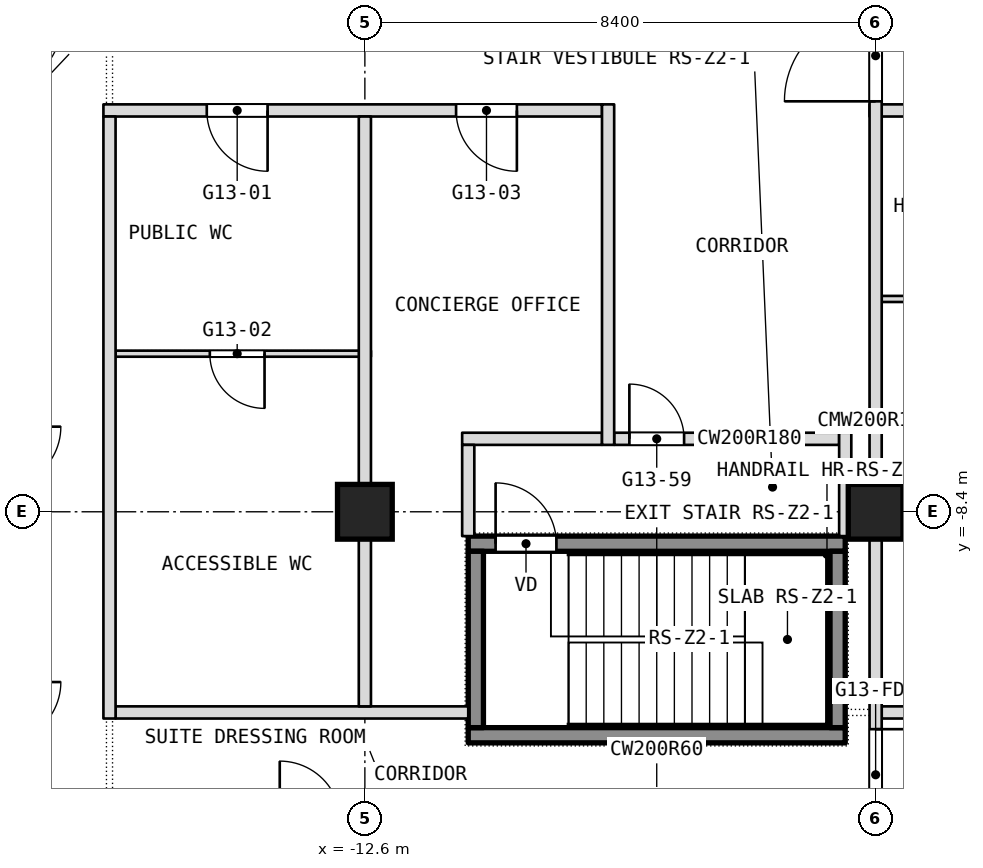
"""IFC4 building model, lengths in metres.
Left out: names, types, materials, properties, quantities, classifications, styles, units other than length and angle.
Written with IfcOpenShell. Run it as: python <this file> out.ifc"""

import sys

from ifc_helpers import new_model, si_unit, direction, frame, frame_2d, origin, origin_2d, place, context, subcontext, project, spatial, rectangle, extrude, element, fill, save


model = new_model("IFC4")
c1 = context("Model", 3, precision=1e-05, world=origin(), true_north=direction((0.0, 1.0)))
c2 = subcontext(c1, "Body", "Model", "MODEL_VIEW")
j1 = project(units=[si_unit("LENGTHUNIT", "METRE"), si_unit("PLANEANGLEUNIT", "RADIAN")], contexts=[c1])
p1 = place(None, origin())
s1 = spatial("IfcSite", under=j1, at=p1, CompositionType="ELEMENT")
p2 = place(p1, origin())
s2 = spatial("IfcBuilding", under=s1, at=p2, CompositionType="ELEMENT")
p3 = place(p2, frame((0.0, 0.0, 151.7)))
s3 = spatial("IfcBuildingStorey", under=s2, at=p3, CompositionType="ELEMENT", Elevation=151.7)
for number, where, z_axis, x_axis in (
    (1, (-12.6, -8.4, 0.0), (0.0, 0.0, 1.0), (1.0, 0.0, 0.0)),
    (2, (-4.2, -8.4, 0.0), (0.0, 0.0, 1.0), (1.0, 0.0, 0.0)),
):
    element("IfcColumn", number, at=place(p3, frame(where, z_axis=z_axis, x_axis=x_axis)), inside=s3, PredefinedType="COLUMN", context=c2, shape_type="SweptSolid", body=[
        extrude(rectangle(XDim=0.9, YDim=0.9, at=origin_2d()), origin(), (0.0, 0.0, 1.0), 3.6),
    ])
p4 = place(p3, frame((-16.7, -11.7, 0.0), z_axis=(0.0, 0.0, 1.0), x_axis=(1.0, 0.0, 0.0)))
e3 = element("IfcWall", 3, at=p4, inside=s3, PredefinedType="PARTITIONING", context=c2, shape_type="SweptSolid", body=[
    extrude(rectangle(XDim=5.8, YDim=0.2, at=frame_2d((2.9, 0.0))), origin(), (0.0, 0.0, 1.0), 3.34),
])
p5 = place(p3, frame((-4.1, -11.7, 0.0), z_axis=(0.0, 0.0, 1.0), x_axis=(1.0, 0.0, 0.0)))
e4 = element("IfcWall", 4, at=p5, inside=s3, PredefinedType="PARTITIONING", context=c2, shape_type="SweptSolid", body=[
    extrude(rectangle(XDim=20.8, YDim=0.2, at=frame_2d((10.4, 0.0))), origin(), (0.0, 0.0, 1.0), 3.34),
])
p6 = place(p5, frame((14.1, 0.0, 0.0)))
e5 = element("IfcOpeningElement", 5, at=p6, cuts=e4, PredefinedType="OPENING", context=c2, shape_type="SweptSolid", body=[
    extrude(rectangle(XDim=1.0, YDim=2.1, at=frame_2d((0.5, 1.05))), frame((0.0, 0.1, 0.0), z_axis=(0.0, -1.0, 0.0), x_axis=(1.0, 0.0, 0.0)), (0.0, 0.0, 1.0), 0.2),
])
p7 = place(p5, frame((5.7, 0.0, 0.0)))
e6 = element("IfcOpeningElement", 6, at=p7, cuts=e4, PredefinedType="OPENING", context=c2, shape_type="SweptSolid", body=[
    extrude(rectangle(XDim=1.0, YDim=2.1, at=frame_2d((0.5, 1.05))), frame((0.0, 0.1, 0.0), z_axis=(0.0, -1.0, 0.0), x_axis=(1.0, 0.0, 0.0)), (0.0, 0.0, 1.0), 0.2),
])
p8 = place(p3, frame((-11.0, -7.2, 0.0), z_axis=(0.0, 0.0, 1.0), x_axis=(1.0, 0.0, 0.0)))
e7 = element("IfcWall", 7, at=p8, inside=s3, PredefinedType="PARTITIONING", context=c2, shape_type="SweptSolid", body=[
    extrude(rectangle(XDim=2.3, YDim=0.2, at=frame_2d((1.15, 0.0))), origin(), (0.0, 0.0, 1.0), 3.34),
])
p9 = place(p3, frame((-8.5, -7.2, 0.0), z_axis=(0.0, 0.0, 1.0), x_axis=(1.0, 0.0, 0.0)))
e8 = element("IfcWall", 8, at=p9, inside=s3, PredefinedType="PARTITIONING", context=c2, shape_type="SweptSolid", body=[
    extrude(rectangle(XDim=3.7, YDim=0.2, at=frame_2d((1.85, 0.0))), origin(), (0.0, 0.0, 1.0), 3.34),
])
p10 = place(p9, frame((0.25, 0.0, 0.0)))
e9 = element("IfcOpeningElement", 9, at=p10, cuts=e8, PredefinedType="OPENING", context=c2, shape_type="SweptSolid", body=[
    extrude(rectangle(XDim=0.9, YDim=2.1, at=frame_2d((0.45, 1.05))), frame((0.0, 0.1, 0.0), z_axis=(0.0, -1.0, 0.0), x_axis=(1.0, 0.0, 0.0)), (0.0, 0.0, 1.0), 0.2),
])
p11 = place(p3, frame((-16.7, -5.8, 0.0), z_axis=(0.0, 0.0, 1.0), x_axis=(1.0, 0.0, 0.0)))
e10 = element("IfcWall", 10, at=p11, inside=s3, PredefinedType="PARTITIONING", context=c2, shape_type="SweptSolid", body=[
    extrude(rectangle(XDim=4.2, YDim=0.1, at=frame_2d((2.1, 0.0))), origin(), (0.0, 0.0, 1.0), 3.34),
])
p12 = place(p11, frame((1.55, 0.0, 0.0)))
e11 = element("IfcOpeningElement", 11, at=p12, cuts=e10, PredefinedType="OPENING", context=c2, shape_type="SweptSolid", body=[
    extrude(rectangle(XDim=0.9, YDim=2.1, at=frame_2d((0.45, 1.05))), frame((0.0, 0.05, 0.0), z_axis=(0.0, -1.0, 0.0), x_axis=(1.0, 0.0, 0.0)), (0.0, 0.0, 1.0), 0.1),
])
p13 = place(p3, frame((-4.1, -4.9, 0.0), z_axis=(0.0, 0.0, 1.0), x_axis=(1.0, 0.0, 0.0)))
e12 = element("IfcWall", 12, at=p13, inside=s3, PredefinedType="PARTITIONING", context=c2, shape_type="SweptSolid", body=[
    extrude(rectangle(XDim=4.2, YDim=0.1, at=frame_2d((2.1, 0.0))), origin(), (0.0, 0.0, 1.0), 3.34),
])
p14 = place(p13, frame((1.55, 0.0, 0.0)))
e13 = element("IfcOpeningElement", 13, at=p14, cuts=e12, PredefinedType="OPENING", context=c2, shape_type="SweptSolid", body=[
    extrude(rectangle(XDim=0.9, YDim=2.1, at=frame_2d((0.45, 1.05))), frame((0.0, 0.05, 0.0), z_axis=(0.0, -1.0, 0.0), x_axis=(1.0, 0.0, 0.0)), (0.0, 0.0, 1.0), 0.1),
])
p15 = place(p3, frame((-16.9, -1.8, 0.0), z_axis=(0.0, 0.0, 1.0), x_axis=(1.0, 0.0, 0.0)))
e14 = element("IfcWall", 14, at=p15, inside=s3, PredefinedType="PARTITIONING", context=c2, shape_type="SweptSolid", body=[
    extrude(rectangle(XDim=8.2, YDim=0.2, at=frame_2d((4.1, 0.0))), origin(), (0.0, 0.0, 1.0), 3.34),
])
p16 = place(p15, frame((1.7, 0.0, 0.0)))
e15 = element("IfcOpeningElement", 15, at=p16, cuts=e14, PredefinedType="OPENING", context=c2, shape_type="SweptSolid", body=[
    extrude(rectangle(XDim=1.0, YDim=2.1, at=frame_2d((0.5, 1.05))), frame((0.0, 0.1, 0.0), z_axis=(0.0, -1.0, 0.0), x_axis=(1.0, 0.0, 0.0)), (0.0, 0.0, 1.0), 0.2),
])
p17 = place(p15, frame((5.8, 0.0, 0.0)))
e16 = element("IfcOpeningElement", 16, at=p17, cuts=e14, PredefinedType="OPENING", context=c2, shape_type="SweptSolid", body=[
    extrude(rectangle(XDim=1.0, YDim=2.1, at=frame_2d((0.5, 1.05))), frame((0.0, 0.1, 0.0), z_axis=(0.0, -1.0, 0.0), x_axis=(1.0, 0.0, 0.0)), (0.0, 0.0, 1.0), 0.2),
])
p18 = place(p3, frame((-4.3, -1.8, 0.0), z_axis=(0.0, 0.0, 1.0), x_axis=(1.0, 0.0, 0.0)))
e17 = element("IfcWall", 17, at=p18, inside=s3, PredefinedType="PARTITIONING", context=c2, shape_type="SweptSolid", body=[
    extrude(rectangle(XDim=11.3, YDim=0.2, at=frame_2d((5.65, 0.0))), origin(), (0.0, 0.0, 1.0), 3.34),
])
p19 = place(p18, frame((1.7, 0.0, 0.0)))
e18 = element("IfcOpeningElement", 18, at=p19, cuts=e17, PredefinedType="OPENING", context=c2, shape_type="SweptSolid", body=[
    extrude(rectangle(XDim=1.0, YDim=2.1, at=frame_2d((0.5, 1.05))), frame((0.0, 0.1, 0.0), z_axis=(0.0, -1.0, 0.0), x_axis=(1.0, 0.0, 0.0)), (0.0, 0.0, 1.0), 0.2),
])
p20 = place(p18, frame((10.1, 0.0, 0.0)))
e19 = element("IfcOpeningElement", 19, at=p20, cuts=e17, PredefinedType="OPENING", context=c2, shape_type="SweptSolid", body=[
    extrude(rectangle(XDim=1.0, YDim=2.1, at=frame_2d((0.5, 1.05))), frame((0.0, 0.1, 0.0), z_axis=(0.0, -1.0, 0.0), x_axis=(1.0, 0.0, 0.0)), (0.0, 0.0, 1.0), 0.2),
])
p21 = place(p18, frame((5.9, 0.0, 0.0)))
e20 = element("IfcOpeningElement", 20, at=p21, cuts=e17, PredefinedType="OPENING", context=c2, shape_type="SweptSolid", body=[
    extrude(rectangle(XDim=1.0, YDim=2.1, at=frame_2d((0.5, 1.05))), frame((0.0, 0.1, 0.0), z_axis=(0.0, -1.0, 0.0), x_axis=(1.0, 0.0, 0.0)), (0.0, 0.0, 1.0), 0.2),
])
p22 = place(p3, frame((-4.2, -13.8, 0.0), z_axis=(0.0, 0.0, 1.0), x_axis=(0.0, 1.0, 0.0)))
e21 = element("IfcWall", 21, at=p22, inside=s3, PredefinedType="PARTITIONING", context=c2, shape_type="SweptSolid", body=[
    extrude(rectangle(XDim=13.8, YDim=0.2, at=frame_2d((6.9, 0.0))), origin(), (0.0, 0.0, 1.0), 3.34),
])
p23 = place(p22, frame((12.15, 0.0, 0.0)))
e22 = element("IfcOpeningElement", 22, at=p23, cuts=e21, PredefinedType="OPENING", context=c2, shape_type="SweptSolid", body=[
    extrude(rectangle(XDim=1.5, YDim=2.1, at=frame_2d((0.75, 1.05))), frame((0.0, 0.1, 0.0), z_axis=(0.0, -1.0, 0.0), x_axis=(1.0, 0.0, 0.0)), (0.0, 0.0, 1.0), 0.2),
])
p24 = place(p22, frame((0.325, 0.0, 0.0)))
e23 = element("IfcOpeningElement", 23, at=p24, cuts=e21, PredefinedType="OPENING", context=c2, shape_type="SweptSolid", body=[
    extrude(rectangle(XDim=1.5, YDim=2.1, at=frame_2d((0.75, 1.05))), frame((0.0, 0.1, 0.0), z_axis=(0.0, -1.0, 0.0), x_axis=(1.0, 0.0, 0.0)), (0.0, 0.0, 1.0), 0.2),
])
p25 = place(p3, frame((-4.7, -8.8, 0.0), z_axis=(0.0, 0.0, 1.0), x_axis=(0.0, 1.0, 0.0)))
e24 = element("IfcWall", 24, at=p25, inside=s3, PredefinedType="PARTITIONING", context=c2, shape_type="SweptSolid", body=[
    extrude(rectangle(XDim=1.7, YDim=0.2, at=frame_2d((0.85, 0.0))), origin(), (0.0, 0.0, 1.0), 3.34),
])
p26 = place(p3, frame((-8.6, -7.3, 0.0), z_axis=(0.0, 0.0, 1.0), x_axis=(0.0, 1.0, 0.0)))
e25 = element("IfcWall", 25, at=p26, inside=s3, PredefinedType="PARTITIONING", context=c2, shape_type="SweptSolid", body=[
    extrude(rectangle(XDim=5.6, YDim=0.2, at=frame_2d((2.8, 0.0))), origin(), (0.0, 0.0, 1.0), 3.34),
])
p27 = place(p3, frame((-10.9, -8.8, 0.0), z_axis=(0.0, 0.0, 1.0), x_axis=(0.0, 1.0, 0.0)))
e26 = element("IfcWall", 26, at=p27, inside=s3, PredefinedType="PARTITIONING", context=c2, shape_type="SweptSolid", body=[
    extrude(rectangle(XDim=1.5, YDim=0.2, at=frame_2d((0.75, 0.0))), origin(), (0.0, 0.0, 1.0), 3.34),
])
p28 = place(p3, frame((-12.6, -11.6, 0.0), z_axis=(0.0, 0.0, 1.0), x_axis=(0.0, 1.0, 0.0)))
e27 = element("IfcWall", 27, at=p28, inside=s3, PredefinedType="PARTITIONING", context=c2, shape_type="SweptSolid", body=[
    extrude(rectangle(XDim=9.7, YDim=0.2, at=frame_2d((4.85, 0.0))), origin(), (0.0, 0.0, 1.0), 3.34),
])
p29 = place(p3, frame((-16.8, -11.8, 0.0), z_axis=(0.0, 0.0, 1.0), x_axis=(0.0, 1.0, 0.0)))
e28 = element("IfcWall", 28, at=p29, inside=s3, PredefinedType="PARTITIONING", context=c2, shape_type="SweptSolid", body=[
    extrude(rectangle(XDim=9.9, YDim=0.2, at=frame_2d((4.95, 0.0))), origin(), (0.0, 0.0, 1.0), 3.34),
])
p30 = place(p3, frame((-10.9, -12.075, 0.1), z_axis=(0.0, 0.0, 1.0), x_axis=(1.0, 0.0, 0.0)))
e29 = element("IfcWall", 29, at=p30, inside=s3, PredefinedType="SHEAR", context=c2, shape_type="SweptSolid", body=[
    extrude(rectangle(XDim=6.2, YDim=0.25, at=frame_2d((3.1, 0.0))), origin(), (0.0, 0.0, 1.0), 3.6),
])
p31 = place(p3, frame((-10.9, -8.925, 0.1), z_axis=(0.0, 0.0, 1.0), x_axis=(1.0, 0.0, 0.0)))
e30 = element("IfcWall", 30, at=p31, inside=s3, PredefinedType="SHEAR", context=c2, shape_type="SweptSolid", body=[
    extrude(rectangle(XDim=6.2, YDim=0.25, at=frame_2d((3.1, 0.0))), origin(), (0.0, 0.0, 1.0), 3.6),
])
p32 = place(p31, frame((0.45, 0.0, 0.0)))
e31 = element("IfcOpeningElement", 31, at=p32, cuts=e30, PredefinedType="OPENING", context=c2, shape_type="SweptSolid", body=[
    extrude(rectangle(XDim=1.0, YDim=2.1, at=frame_2d((0.5, 1.05))), frame((0.0, 0.125, 0.0), z_axis=(0.0, -1.0, 0.0), x_axis=(1.0, 0.0, 0.0)), (0.0, 0.0, 1.0), 0.25),
])
for number, where, z_axis, x_axis in (
    (32, (-10.775, -11.95, 0.1), (0.0, 0.0, 1.0), (0.0, 1.0, 0.0)),
    (33, (-4.825, -11.95, 0.1), (0.0, 0.0, 1.0), (0.0, 1.0, 0.0)),
):
    element("IfcWall", number, at=place(p3, frame(where, z_axis=z_axis, x_axis=x_axis)), inside=s3, PredefinedType="SHEAR", context=c2, shape_type="SweptSolid", body=[
        extrude(rectangle(XDim=2.9, YDim=0.25, at=frame_2d((1.45, 0.0))), origin(), (0.0, 0.0, 1.0), 3.6),
    ])
p33 = place(p10, origin())
e34 = element("IfcDoor", 34, at=p33, inside=s3, OperationType="SINGLE_SWING_RIGHT", PredefinedType="DOOR", context=c2, shape_type="SweptSolid", body=[
    extrude(rectangle(XDim=0.9, YDim=2.1, at=frame_2d((0.45, 1.05))), frame((0.0, 0.025, 0.0), z_axis=(0.0, -1.0, 0.0), x_axis=(1.0, 0.0, 0.0)), (0.0, 0.0, 1.0), 0.05),
])
fill(e9, e34)
p34 = place(p12, origin())
e35 = element("IfcDoor", 35, at=p34, inside=s3, OperationType="SINGLE_SWING_RIGHT", PredefinedType="DOOR", context=c2, shape_type="SweptSolid", body=[
    extrude(rectangle(XDim=0.9, YDim=2.1, at=frame_2d((0.45, 1.05))), frame((0.0, 0.025, 0.0), z_axis=(0.0, -1.0, 0.0), x_axis=(1.0, 0.0, 0.0)), (0.0, 0.0, 1.0), 0.05),
])
fill(e11, e35)
p35 = place(p16, origin())
e36 = element("IfcDoor", 36, at=p35, inside=s3, OperationType="SINGLE_SWING_LEFT", PredefinedType="DOOR", context=c2, shape_type="SweptSolid", body=[
    extrude(rectangle(XDim=1.0, YDim=2.1, at=frame_2d((0.5, 1.05))), frame((0.0, 0.025, 0.0), z_axis=(0.0, -1.0, 0.0), x_axis=(1.0, 0.0, 0.0)), (0.0, 0.0, 1.0), 0.05),
])
fill(e15, e36)
p36 = place(p17, origin())
e37 = element("IfcDoor", 37, at=p36, inside=s3, OperationType="SINGLE_SWING_LEFT", PredefinedType="DOOR", context=c2, shape_type="SweptSolid", body=[
    extrude(rectangle(XDim=1.0, YDim=2.1, at=frame_2d((0.5, 1.05))), frame((0.0, 0.025, 0.0), z_axis=(0.0, -1.0, 0.0), x_axis=(1.0, 0.0, 0.0)), (0.0, 0.0, 1.0), 0.05),
])
fill(e16, e37)
p37 = place(p32, origin())
e38 = element("IfcDoor", 38, at=p37, inside=s3, OperationType="SINGLE_SWING_LEFT", PredefinedType="DOOR", context=c2, shape_type="SweptSolid", body=[
    extrude(rectangle(XDim=1.0, YDim=2.1, at=frame_2d((0.5, 1.05))), frame((0.0, 0.025, 0.0), z_axis=(0.0, -1.0, 0.0), x_axis=(1.0, 0.0, 0.0)), (0.0, 0.0, 1.0), 0.05),
])
fill(e31, e38)
p38 = place(p23, origin())
e39 = element("IfcDoor", 39, at=p38, inside=s3, OperationType="DOUBLE_DOOR_DOUBLE_SWING", PredefinedType="DOOR", context=c2, shape_type="SweptSolid", body=[
    extrude(rectangle(XDim=1.5, YDim=2.1, at=frame_2d((0.75, 1.05))), frame((0.0, 0.025, 0.0), z_axis=(0.0, -1.0, 0.0), x_axis=(1.0, 0.0, 0.0)), (0.0, 0.0, 1.0), 0.05),
])
fill(e22, e39)
p39 = place(p24, origin())
e40 = element("IfcDoor", 40, at=p39, inside=s3, OperationType="DOUBLE_DOOR_DOUBLE_SWING", PredefinedType="DOOR", context=c2, shape_type="SweptSolid", body=[
    extrude(rectangle(XDim=1.5, YDim=2.1, at=frame_2d((0.75, 1.05))), frame((0.0, 0.025, 0.0), z_axis=(0.0, -1.0, 0.0), x_axis=(1.0, 0.0, 0.0)), (0.0, 0.0, 1.0), 0.05),
])
fill(e23, e40)
save(model, sys.argv[1])
